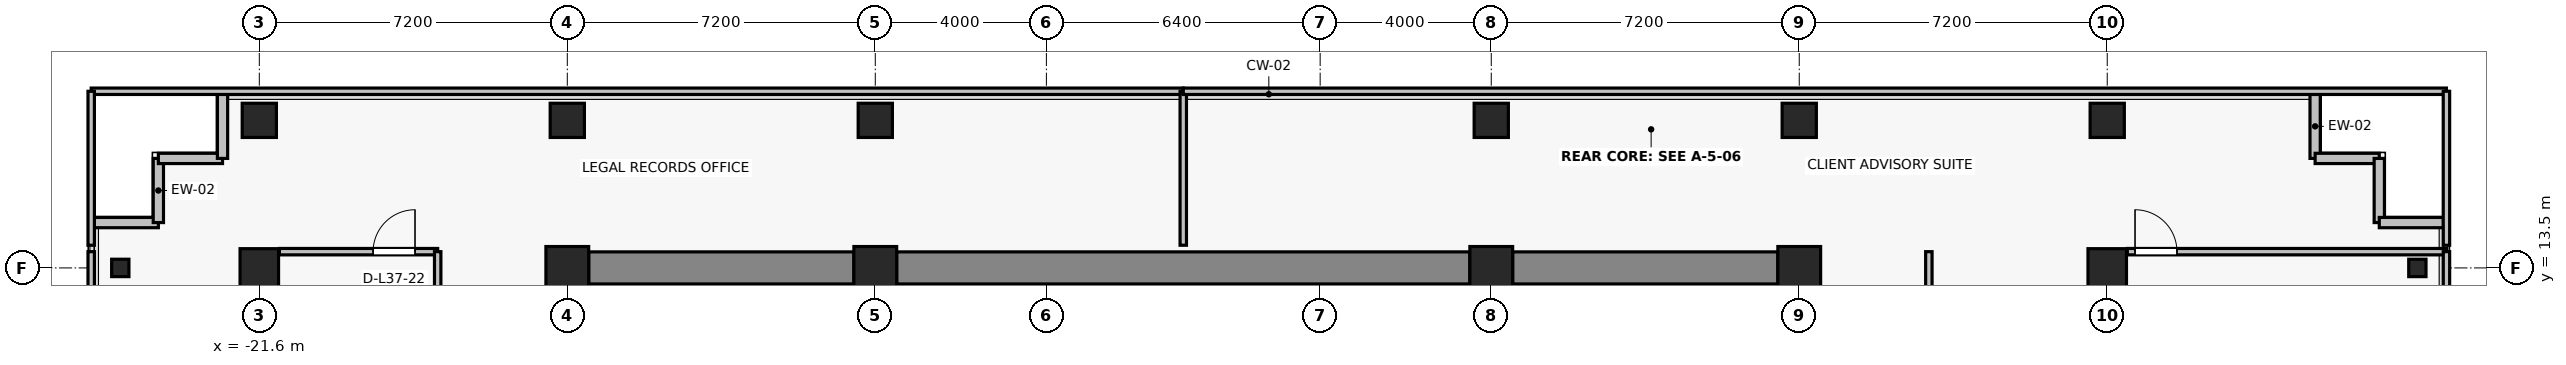
"""IFC4 building model, lengths in metres.
Left out: names, types, materials, properties, quantities, classifications, styles, units other than length and angle.
Written with IfcOpenShell. Run it as: python <this file> out.ifc"""

import sys

from ifc_helpers import new_model, si_unit, direction, frame, frame_2d, origin, origin_2d, place, context, subcontext, project, spatial, rectangle, i_section, extrude, source, transform, mapped, element, fill, save


model = new_model("IFC4")
c1 = context("Model", 3, precision=1e-05, world=origin(), true_north=direction((0.0, 1.0)))
c2 = subcontext(c1, "Body", "Model", "MODEL_VIEW")
j1 = project(units=[si_unit("LENGTHUNIT", "METRE"), si_unit("PLANEANGLEUNIT", "RADIAN")], contexts=[c1])
p1 = place(None, origin())
s1 = spatial("IfcSite", under=j1, at=p1, CompositionType="ELEMENT")
p2 = place(p1, origin())
s2 = spatial("IfcBuilding", under=s1, at=p2, CompositionType="ELEMENT")
p3 = place(p2, frame((0.0, 0.0, 133.0)))
s3 = spatial("IfcBuildingStorey", under=s2, at=p3, CompositionType="ELEMENT", Elevation=133.0)
for number, where, z_axis, x_axis in (
    (1, (-14.4, 13.5, 0.0), (0.0, 0.0, 1.0), (1.0, 0.0, 0.0)),
    (2, (-7.2, 13.5, 0.0), (0.0, 0.0, 1.0), (1.0, 0.0, 0.0)),
    (3, (7.2, 13.5, 0.0), (0.0, 0.0, 1.0), (1.0, 0.0, 0.0)),
    (4, (14.4, 13.5, 0.0), (0.0, 0.0, 1.0), (1.0, 0.0, 0.0)),
):
    element("IfcColumn", number, at=place(p3, frame(where, z_axis=z_axis, x_axis=x_axis)), inside=s3, PredefinedType="COLUMN", context=c2, shape_type="SweptSolid", body=[
        extrude(rectangle(XDim=1.0, YDim=1.0, at=origin_2d()), origin(), (0.0, 0.0, 1.0), 3.3),
    ])
for number, where, z_axis, x_axis in (
    (5, (-21.6, 13.5, 0.0), (0.0, 0.0, 1.0), (1.0, 0.0, 0.0)),
    (6, (21.6, 13.5, 0.0), (0.0, 0.0, 1.0), (1.0, 0.0, 0.0)),
):
    element("IfcColumn", number, at=place(p3, frame(where, z_axis=z_axis, x_axis=x_axis)), inside=s3, PredefinedType="COLUMN", context=c2, shape_type="SweptSolid", body=[
        extrude(rectangle(XDim=0.9, YDim=0.9, at=origin_2d()), origin(), (0.0, 0.0, 1.0), 3.3),
    ])
for number, where, z_axis, x_axis in (
    (7, (-14.4, 16.95, 0.0), (0.0, 0.0, 1.0), (1.0, 0.0, 0.0)),
    (8, (-7.2, 16.95, 0.0), (0.0, 0.0, 1.0), (1.0, 0.0, 0.0)),
    (9, (7.2, 16.95, 0.0), (0.0, 0.0, 1.0), (1.0, 0.0, 0.0)),
    (10, (14.4, 16.95, 0.0), (0.0, 0.0, 1.0), (1.0, 0.0, 0.0)),
    (11, (-21.6, 16.95, 0.0), (0.0, 0.0, 1.0), (1.0, 0.0, 0.0)),
    (12, (21.6, 16.95, 0.0), (0.0, 0.0, 1.0), (1.0, 0.0, 0.0)),
):
    element("IfcColumn", number, at=place(p3, frame(where, z_axis=z_axis, x_axis=x_axis)), inside=s3, PredefinedType="COLUMN", context=c2, shape_type="SweptSolid", body=[
        extrude(rectangle(XDim=0.8, YDim=0.8, at=origin_2d()), origin(), (0.0, 0.0, 1.0), 3.3),
    ])
for number, where, z_axis, x_axis in (
    (13, (-24.85, 13.5, 0.0), (0.0, 0.0, 1.0), (1.0, 0.0, 0.0)),
    (14, (28.85, 13.5, 0.0), (0.0, 0.0, 1.0), (1.0, 0.0, 0.0)),
):
    element("IfcColumn", number, at=place(p3, frame(where, z_axis=z_axis, x_axis=x_axis)), inside=s3, PredefinedType="COLUMN", context=c2, shape_type="SweptSolid", body=[
        extrude(i_section(OverallWidth=0.404, OverallDepth=0.407, WebThickness=0.022, FlangeThickness=0.032, FilletRadius=0.015, at=origin_2d()), origin(), (0.0, 0.0, 1.0), 3.3),
    ])
p4 = place(p3, frame((-13.9, 13.5, 0.0), z_axis=(0.0, 0.0, 1.0), x_axis=(1.0, 0.0, 0.0)))
e15 = element("IfcWall", 15, at=p4, inside=s3, PredefinedType="SHEAR", context=c2, shape_type="SweptSolid", body=[
    extrude(rectangle(XDim=6.2, YDim=0.75, at=frame_2d((3.1, 0.0))), origin(), (0.0, 0.0, 1.0), 3.075),
])
p5 = place(p3, frame((-6.7, 13.5, 0.0), z_axis=(0.0, 0.0, 1.0), x_axis=(1.0, 0.0, 0.0)))
e16 = element("IfcWall", 16, at=p5, inside=s3, PredefinedType="SHEAR", context=c2, shape_type="SweptSolid", body=[
    extrude(rectangle(XDim=13.4, YDim=0.75, at=frame_2d((6.7, 0.0))), origin(), (0.0, 0.0, 1.0), 3.075),
])
p6 = place(p3, frame((7.7, 13.5, 0.0), z_axis=(0.0, 0.0, 1.0), x_axis=(1.0, 0.0, 0.0)))
e17 = element("IfcWall", 17, at=p6, inside=s3, PredefinedType="SHEAR", context=c2, shape_type="SweptSolid", body=[
    extrude(rectangle(XDim=6.2, YDim=0.75, at=frame_2d((3.1, 0.0))), origin(), (0.0, 0.0, 1.0), 3.075),
])
for number, where, z_axis, x_axis in (
    (18, (-23.96, 14.56, 0.0), (0.0, 0.0, 1.0), (-1.0, 0.0, 0.0)),
    (19, (-23.96, 16.06, 0.0), (0.0, 0.0, 1.0), (0.0, -1.0, 0.0)),
    (20, (-22.46, 16.06, 0.0), (0.0, 0.0, 1.0), (-1.0, 0.0, 0.0)),
):
    element("IfcWall", number, at=place(p3, frame(where, z_axis=z_axis, x_axis=x_axis)), inside=s3, PredefinedType="SOLIDWALL", context=c2, shape_type="SweptSolid", body=[
        extrude(rectangle(XDim=1.5, YDim=0.24, at=frame_2d((0.75, 0.0))), origin(), (0.0, 0.0, 1.0), 3.075),
    ])
p7 = place(p3, frame((-22.46, 17.56, 0.0), z_axis=(0.0, 0.0, 1.0), x_axis=(0.0, -1.0, 0.0)))
e21 = element("IfcWall", 21, at=p7, inside=s3, PredefinedType="SOLIDWALL", context=c2, shape_type="SweptSolid", body=[
    extrude(rectangle(XDim=1.5, YDim=0.24, at=frame_2d((0.75, 0.0))), origin(), (0.0, 0.0, 1.0), 2.565),
])
for number, where, z_axis, x_axis in (
    (22, (26.46, 16.06, 0.0), (0.0, 0.0, 1.0), (0.0, 1.0, 0.0)),
    (23, (27.96, 16.06, 0.0), (0.0, 0.0, 1.0), (-1.0, 0.0, 0.0)),
    (24, (27.96, 14.56, 0.0), (0.0, 0.0, 1.0), (0.0, 1.0, 0.0)),
    (25, (29.46, 14.56, 0.0), (0.0, 0.0, 1.0), (-1.0, 0.0, 0.0)),
):
    element("IfcWall", number, at=place(p3, frame(where, z_axis=z_axis, x_axis=x_axis)), inside=s3, PredefinedType="SOLIDWALL", context=c2, shape_type="SweptSolid", body=[
        extrude(rectangle(XDim=1.5, YDim=0.24, at=frame_2d((0.75, 0.0))), origin(), (0.0, 0.0, 1.0), 3.075),
    ])
p8 = place(p3, frame((-21.13, 13.88, 0.0), z_axis=(0.0, 0.0, 1.0), x_axis=(1.0, 0.0, 0.0)))
e26 = element("IfcWall", 26, at=p8, inside=s3, PredefinedType="PARTITIONING", context=c2, shape_type="SweptSolid", body=[
    extrude(rectangle(XDim=3.7, YDim=0.15, at=frame_2d((1.85, 0.0))), origin(), (0.0, 0.0, 1.0), 3.075),
])
p9 = place(p8, frame((2.19, 0.0, 0.0)))
e27 = element("IfcOpeningElement", 27, at=p9, cuts=e26, PredefinedType="OPENING", context=c2, shape_type="SweptSolid", body=[
    extrude(rectangle(XDim=0.98, YDim=2.15, at=frame_2d((0.49, 1.075))), frame((0.0, 0.085, 0.0), z_axis=(0.0, -1.0, 0.0), x_axis=(1.0, 0.0, 0.0)), (0.0, 0.0, 1.0), 0.17),
])
p10 = place(p3, frame((-25.53, -1.77, 0.0), z_axis=(0.0, 0.0, 1.0), x_axis=(0.0, 1.0, 0.0)))
e28 = element("IfcWall", 28, at=p10, inside=s3, PredefinedType="PARTITIONING", context=c2, shape_type="SweptSolid", body=[
    extrude(rectangle(XDim=15.65, YDim=0.15, at=frame_2d((7.825, 0.0))), origin(), (0.0, 0.0, 1.0), 3.075),
])
p11 = place(p3, frame((-17.43, 13.88, 0.0), z_axis=(0.0, 0.0, 1.0), x_axis=(0.0, -1.0, 0.0)))
e29 = element("IfcWall", 29, at=p11, inside=s3, PredefinedType="PARTITIONING", context=c2, shape_type="SweptSolid", body=[
    extrude(rectangle(XDim=15.65, YDim=0.15, at=frame_2d((7.825, 0.0))), origin(), (0.0, 0.0, 1.0), 2.515),
])
p12 = place(p11, frame((7.335, 0.0, 0.0)))
e30 = element("IfcOpeningElement", 30, at=p12, cuts=e29, PredefinedType="OPENING", context=c2, shape_type="SweptSolid", body=[
    extrude(rectangle(XDim=0.98, YDim=2.15, at=frame_2d((0.49, 1.075))), frame((0.0, 0.085, 0.0), z_axis=(0.0, -1.0, 0.0), x_axis=(1.0, 0.0, 0.0)), (0.0, 0.0, 1.0), 0.17),
])
p13 = place(p3, frame((22.07, 13.88, 0.0), z_axis=(0.0, 0.0, 1.0), x_axis=(1.0, 0.0, 0.0)))
e31 = element("IfcWall", 31, at=p13, inside=s3, PredefinedType="PARTITIONING", context=c2, shape_type="SweptSolid", body=[
    extrude(rectangle(XDim=7.46, YDim=0.15, at=frame_2d((3.73, 0.0))), origin(), (0.0, 0.0, 1.0), 3.075),
])
p14 = place(p13, frame((0.18, 0.0, 0.0)))
e32 = element("IfcOpeningElement", 32, at=p14, cuts=e31, PredefinedType="OPENING", context=c2, shape_type="SweptSolid", body=[
    extrude(rectangle(XDim=0.98, YDim=2.15, at=frame_2d((0.49, 1.075))), frame((0.0, 0.085, 0.0), z_axis=(0.0, -1.0, 0.0), x_axis=(1.0, 0.0, 0.0)), (0.0, 0.0, 1.0), 0.17),
])
p15 = place(p3, frame((17.43, 8.061, 0.0), z_axis=(0.0, 0.0, 1.0), x_axis=(0.0, 1.0, 0.0)))
e33 = element("IfcWall", 33, at=p15, inside=s3, PredefinedType="PARTITIONING", context=c2, shape_type="SweptSolid", body=[
    extrude(rectangle(XDim=5.819, YDim=0.15, at=frame_2d((2.91, 0.0))), origin(), (0.0, 0.0, 1.0), 2.515),
])
p16 = place(p15, frame((2.419, 0.0, 0.0)))
e34 = element("IfcOpeningElement", 34, at=p16, cuts=e33, PredefinedType="OPENING", context=c2, shape_type="SweptSolid", body=[
    extrude(rectangle(XDim=0.98, YDim=2.15, at=frame_2d((0.49, 1.075))), frame((0.0, 0.085, 0.0), z_axis=(0.0, -1.0, 0.0), x_axis=(1.0, 0.0, 0.0)), (0.0, 0.0, 1.0), 0.17),
])
p17 = place(p3, frame((29.53, 13.88, 0.0), z_axis=(0.0, 0.0, 1.0), x_axis=(0.0, -1.0, 0.0)))
e35 = element("IfcWall", 35, at=p17, inside=s3, PredefinedType="PARTITIONING", context=c2, shape_type="SweptSolid", body=[
    extrude(rectangle(XDim=5.819, YDim=0.15, at=frame_2d((2.91, 0.0))), origin(), (0.0, 0.0, 1.0), 3.075),
])
p18 = place(p3, frame((-25.53, 17.63, 0.0), z_axis=(0.0, 0.0, 1.0), x_axis=(1.0, 0.0, 0.0)))
e36 = element("IfcWall", 36, at=p18, inside=s3, PredefinedType="PARTITIONING", context=c2, shape_type="SweptSolid", body=[
    extrude(rectangle(XDim=25.53, YDim=0.15, at=frame_2d((12.765, 0.0))), origin(), (0.0, 0.0, 1.0), 3.075),
])
p19 = place(p3, frame((-25.53, 14.03, 0.0), z_axis=(0.0, 0.0, 1.0), x_axis=(0.0, 1.0, 0.0)))
e37 = element("IfcWall", 37, at=p19, inside=s3, PredefinedType="PARTITIONING", context=c2, shape_type="SweptSolid", body=[
    extrude(rectangle(XDim=3.6, YDim=0.15, at=frame_2d((1.8, 0.0))), origin(), (0.0, 0.0, 1.0), 3.075),
])
p20 = place(p3, frame((0.0, 17.63, 0.0), z_axis=(0.0, 0.0, 1.0), x_axis=(0.0, -1.0, 0.0)))
e38 = element("IfcWall", 38, at=p20, inside=s3, PredefinedType="PARTITIONING", context=c2, shape_type="SweptSolid", body=[
    extrude(rectangle(XDim=3.6, YDim=0.15, at=frame_2d((1.8, 0.0))), origin(), (0.0, 0.0, 1.0), 2.565),
])
p21 = place(p3, frame((0.0, 17.63, 0.0), z_axis=(0.0, 0.0, 1.0), x_axis=(1.0, 0.0, 0.0)))
e39 = element("IfcWall", 39, at=p21, inside=s3, PredefinedType="PARTITIONING", context=c2, shape_type="SweptSolid", body=[
    extrude(rectangle(XDim=29.53, YDim=0.15, at=frame_2d((14.765, 0.0))), origin(), (0.0, 0.0, 1.0), 3.075),
])
p22 = place(p3, frame((29.53, 17.63, 0.0), z_axis=(0.0, 0.0, 1.0), x_axis=(0.0, -1.0, 0.0)))
e40 = element("IfcWall", 40, at=p22, inside=s3, PredefinedType="PARTITIONING", context=c2, shape_type="SweptSolid", body=[
    extrude(rectangle(XDim=3.6, YDim=0.15, at=frame_2d((1.8, 0.0))), origin(), (0.0, 0.0, 1.0), 3.075),
])
m1 = source(origin(), c2, "Body", "SweptSolid", [
    extrude(rectangle(XDim=0.98, YDim=2.15, at=frame_2d((0.49, 1.075))), frame((0.0, 0.025, 0.0), z_axis=(0.0, -1.0, 0.0), x_axis=(1.0, 0.0, 0.0)), (0.0, 0.0, 1.0), 0.05),
])
p23 = place(p9, origin())
e41 = element("IfcDoor", 41, at=p23, inside=s3, OperationType="SINGLE_SWING_RIGHT", PredefinedType="DOOR", context=c2, shape_type="MappedRepresentation", body=[
    mapped(m1, transform((0.0, 0.0, 0.0), x_axis=(1.0, 0.0, 0.0), y_axis=(0.0, 1.0, 0.0), z_axis=(0.0, 0.0, 1.0), scale=1.0)),
])
fill(e27, e41)
p24 = place(p14, origin())
e42 = element("IfcDoor", 42, at=p24, inside=s3, OperationType="SINGLE_SWING_LEFT", PredefinedType="DOOR", context=c2, shape_type="MappedRepresentation", body=[
    mapped(m1, transform((0.0, 0.0, 0.0), x_axis=(1.0, 0.0, 0.0), y_axis=(0.0, 1.0, 0.0), z_axis=(0.0, 0.0, 1.0), scale=1.0)),
])
fill(e32, e42)
save(model, sys.argv[1])
